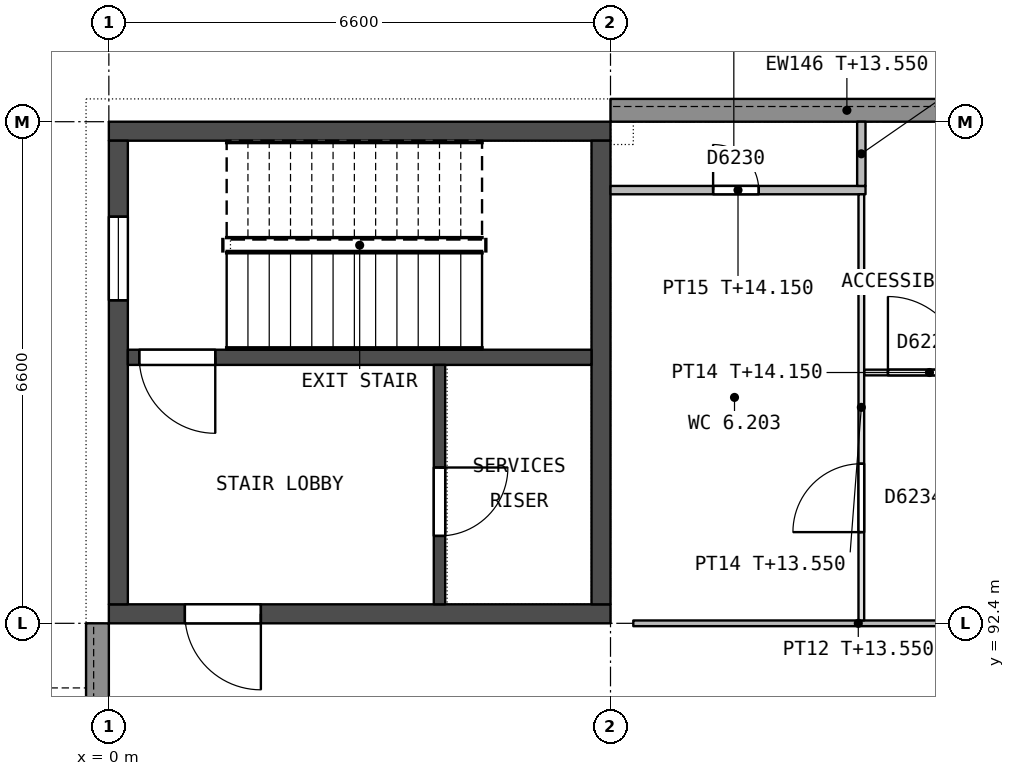
"""IFC4 building model, lengths in metres.
Left out: names, types, materials, properties, quantities, classifications, styles, units other than length and angle.
Written with IfcOpenShell. Run it as: python <this file> out.ifc"""

import sys

from ifc_helpers import new_model, si_unit, direction, frame, frame_2d, origin, place, context, subcontext, project, spatial, rectangle, extrude, element, fill, save


model = new_model("IFC4")
c1 = context("Model", 3, precision=1e-05, world=origin(), true_north=direction((0.0, 1.0)))
c2 = subcontext(c1, "Body", "Model", "MODEL_VIEW")
j1 = project(units=[si_unit("LENGTHUNIT", "METRE"), si_unit("PLANEANGLEUNIT", "RADIAN")], contexts=[c1])
p1 = place(None, origin())
s1 = spatial("IfcSite", under=j1, at=p1, CompositionType="ELEMENT")
p2 = place(p1, origin())
s2 = spatial("IfcBuilding", under=s1, at=p2, CompositionType="ELEMENT")
p3 = place(p2, frame((0.0, 0.0, 9.9)))
s3 = spatial("IfcBuildingStorey", under=s2, at=p3, CompositionType="ELEMENT", Elevation=9.9)
p4 = place(p3, frame((0.0, 92.525, 0.0), z_axis=(0.0, 0.0, 1.0), x_axis=(1.0, 0.0, 0.0)))
e1 = element("IfcWall", 1, at=p4, inside=s3, PredefinedType="SHEAR", context=c2, shape_type="SweptSolid", body=[
    extrude(rectangle(XDim=6.6, YDim=0.25, at=frame_2d((3.3, 0.0))), origin(), (0.0, 0.0, 1.0), 4.25),
])
p5 = place(p4, frame((1.0, 0.0, 0.0)))
e2 = element("IfcOpeningElement", 2, at=p5, cuts=e1, PredefinedType="OPENING", context=c2, shape_type="SweptSolid", body=[
    extrude(rectangle(XDim=1.0, YDim=2.1, at=frame_2d((0.5, 1.05))), frame((0.0, 0.135, 0.0), z_axis=(0.0, -1.0, 0.0), x_axis=(1.0, 0.0, 0.0)), (0.0, 0.0, 1.0), 0.27),
])
p6 = place(p3, frame((0.0, 98.875, 0.0), z_axis=(0.0, 0.0, 1.0), x_axis=(1.0, 0.0, 0.0)))
e3 = element("IfcWall", 3, at=p6, inside=s3, PredefinedType="SHEAR", context=c2, shape_type="SweptSolid", body=[
    extrude(rectangle(XDim=6.6, YDim=0.25, at=frame_2d((3.3, 0.0))), origin(), (0.0, 0.0, 1.0), 4.25),
])
p7 = place(p3, frame((0.125, 92.65, 0.0), z_axis=(0.0, 0.0, 1.0), x_axis=(0.0, 1.0, 0.0)))
e4 = element("IfcWall", 4, at=p7, inside=s3, PredefinedType="SHEAR", context=c2, shape_type="SweptSolid", body=[
    extrude(rectangle(XDim=6.1, YDim=0.25, at=frame_2d((3.05, 0.0))), origin(), (0.0, 0.0, 1.0), 4.25),
])
p8 = place(p7, frame((4.0, 0.0, 0.7)))
e5 = element("IfcOpeningElement", 5, at=p8, cuts=e4, PredefinedType="OPENING", context=c2, shape_type="SweptSolid", body=[
    extrude(rectangle(XDim=1.1, YDim=1.5, at=frame_2d((0.55, 0.75))), frame((0.0, 0.135, 0.0), z_axis=(0.0, -1.0, 0.0), x_axis=(1.0, 0.0, 0.0)), (0.0, 0.0, 1.0), 0.27),
])
p9 = place(p3, frame((6.475, 92.65, 0.0), z_axis=(0.0, 0.0, 1.0), x_axis=(0.0, 1.0, 0.0)))
e6 = element("IfcWall", 6, at=p9, inside=s3, PredefinedType="SHEAR", context=c2, shape_type="SweptSolid", body=[
    extrude(rectangle(XDim=6.1, YDim=0.25, at=frame_2d((3.05, 0.0))), origin(), (0.0, 0.0, 1.0), 4.25),
])
p10 = place(p3, frame((0.25, 95.9, 0.0), z_axis=(0.0, 0.0, 1.0), x_axis=(1.0, 0.0, 0.0)))
e7 = element("IfcWall", 7, at=p10, inside=s3, PredefinedType="SHEAR", context=c2, shape_type="SweptSolid", body=[
    extrude(rectangle(XDim=6.1, YDim=0.2, at=frame_2d((3.05, 0.0))), origin(), (0.0, 0.0, 1.0), 4.25),
])
p11 = place(p10, frame((0.15, 0.0, 0.0)))
e8 = element("IfcOpeningElement", 8, at=p11, cuts=e7, PredefinedType="OPENING", context=c2, shape_type="SweptSolid", body=[
    extrude(rectangle(XDim=1.0, YDim=2.1, at=frame_2d((0.5, 1.05))), frame((0.0, 0.11, 0.0), z_axis=(0.0, -1.0, 0.0), x_axis=(1.0, 0.0, 0.0)), (0.0, 0.0, 1.0), 0.22),
])
p12 = place(p3, frame((4.35, 92.65, 0.0), z_axis=(0.0, 0.0, 1.0), x_axis=(0.0, 1.0, 0.0)))
e9 = element("IfcWall", 9, at=p12, inside=s3, PredefinedType="SHEAR", context=c2, shape_type="SweptSolid", body=[
    extrude(rectangle(XDim=3.15, YDim=0.15, at=frame_2d((1.575, 0.0))), origin(), (0.0, 0.0, 1.0), 4.25),
])
p13 = place(p12, frame((0.9, 0.0, 0.0)))
e10 = element("IfcOpeningElement", 10, at=p13, cuts=e9, PredefinedType="OPENING", context=c2, shape_type="SweptSolid", body=[
    extrude(rectangle(XDim=0.9, YDim=2.1, at=frame_2d((0.45, 1.05))), frame((0.0, 0.085, 0.0), z_axis=(0.0, -1.0, 0.0), x_axis=(1.0, 0.0, 0.0)), (0.0, 0.0, 1.0), 0.17),
])
p14 = place(p3, frame((6.6, 99.15, 0.0), z_axis=(0.0, 0.0, 1.0), x_axis=(1.0, 0.0, 0.0)))
e11 = element("IfcWall", 11, at=p14, inside=s3, PredefinedType="STANDARD", context=c2, shape_type="SweptSolid", body=[
    extrude(rectangle(XDim=6.3, YDim=0.3, at=frame_2d((3.15, 0.0))), origin(), (0.0, 0.0, 1.0), 3.65),
])
p15 = place(p3, frame((-0.15, 89.3, 0.0), z_axis=(0.0, 0.0, 1.0), x_axis=(0.0, 1.0, 0.0)))
e12 = element("IfcWall", 12, at=p15, inside=s3, PredefinedType="STANDARD", context=c2, shape_type="SweptSolid", body=[
    extrude(rectangle(XDim=3.1, YDim=0.3, at=frame_2d((1.55, 0.0))), origin(), (0.0, 0.0, 1.0), 3.65),
])
p16 = place(p15, frame((0.85, 0.0, 1.1)))
e13 = element("IfcOpeningElement", 13, at=p16, cuts=e12, PredefinedType="OPENING", context=c2, shape_type="SweptSolid", body=[
    extrude(rectangle(XDim=1.2, YDim=1.2, at=frame_2d((0.6, 0.6))), frame((0.0, 0.16, 0.0), z_axis=(0.0, -1.0, 0.0), x_axis=(1.0, 0.0, 0.0)), (0.0, 0.0, 1.0), 0.32),
])
p17 = place(p3, frame((6.9, 92.4, 0.0), z_axis=(0.0, 0.0, 1.0), x_axis=(1.0, 0.0, 0.0)))
e14 = element("IfcWall", 14, at=p17, inside=s3, PredefinedType="PARTITIONING", context=c2, shape_type="SweptSolid", body=[
    extrude(rectangle(XDim=6.0, YDim=0.075, at=frame_2d((3.0, 0.0))), origin(), (0.0, 0.0, 1.0), 3.65),
])
p18 = place(p17, frame((4.2, 0.0, 0.0)))
e15 = element("IfcOpeningElement", 15, at=p18, cuts=e14, PredefinedType="OPENING", context=c2, shape_type="SweptSolid", body=[
    extrude(rectangle(XDim=0.9, YDim=2.1, at=frame_2d((0.45, 1.05))), frame((0.0, 0.047, 0.0), z_axis=(0.0, -1.0, 0.0), x_axis=(1.0, 0.0, 0.0)), (0.0, 0.0, 1.0), 0.095),
])
p19 = place(p3, frame((11.655, 95.7, 0.0), z_axis=(0.0, 0.0, 1.0), x_axis=(-1.0, 0.0, 0.0)))
e16 = element("IfcWall", 16, at=p19, inside=s3, PredefinedType="PARTITIONING", context=c2, shape_type="SweptSolid", body=[
    extrude(rectangle(XDim=1.717, YDim=0.075, at=frame_2d((0.858, 0.0))), origin(), (0.0, 0.0, 1.0), 4.25),
])
p20 = place(p19, frame((0.405, 0.0, 0.0)))
e17 = element("IfcOpeningElement", 17, at=p20, cuts=e16, PredefinedType="OPENING", context=c2, shape_type="SweptSolid", body=[
    extrude(rectangle(XDim=1.0, YDim=2.1, at=frame_2d((0.5, 1.05))), frame((0.0, 0.047, 0.0), z_axis=(0.0, -1.0, 0.0), x_axis=(1.0, 0.0, 0.0)), (0.0, 0.0, 1.0), 0.095),
])
p21 = place(p3, frame((9.955, 98.1, 0.0), z_axis=(0.0, 0.0, 1.0), x_axis=(-1.0, 0.0, 0.0)))
e18 = element("IfcWall", 18, at=p21, inside=s3, PredefinedType="PARTITIONING", context=c2, shape_type="SweptSolid", body=[
    extrude(rectangle(XDim=3.355, YDim=0.11, at=frame_2d((1.677, 0.0))), origin(), (0.0, 0.0, 1.0), 4.25),
])
p22 = place(p21, frame((1.405, 0.0, 0.0)))
e19 = element("IfcOpeningElement", 19, at=p22, cuts=e18, PredefinedType="OPENING", context=c2, shape_type="SweptSolid", body=[
    extrude(rectangle(XDim=0.6, YDim=2.1, at=frame_2d((0.3, 1.05))), frame((0.0, 0.065, 0.0), z_axis=(0.0, -1.0, 0.0), x_axis=(1.0, 0.0, 0.0)), (0.0, 0.0, 1.0), 0.13),
])
p23 = place(p3, frame((9.9, 92.438, 0.0), z_axis=(0.0, 0.0, 1.0), x_axis=(0.0, 1.0, 0.0)))
e20 = element("IfcWall", 20, at=p23, inside=s3, PredefinedType="PARTITIONING", context=c2, shape_type="SweptSolid", body=[
    extrude(rectangle(XDim=5.607, YDim=0.075, at=frame_2d((2.803, 0.0))), origin(), (0.0, 0.0, 1.0), 3.65),
])
p24 = place(p23, frame((1.162, 0.0, 0.0)))
e21 = element("IfcOpeningElement", 21, at=p24, cuts=e20, PredefinedType="OPENING", context=c2, shape_type="SweptSolid", body=[
    extrude(rectangle(XDim=0.9, YDim=2.1, at=frame_2d((0.45, 1.05))), frame((0.0, 0.047, 0.0), z_axis=(0.0, -1.0, 0.0), x_axis=(1.0, 0.0, 0.0)), (0.0, 0.0, 1.0), 0.095),
])
p25 = place(p3, frame((9.9, 98.155, 0.0), z_axis=(0.0, 0.0, 1.0), x_axis=(0.0, 1.0, 0.0)))
e22 = element("IfcWall", 22, at=p25, inside=s3, PredefinedType="PARTITIONING", context=c2, shape_type="SweptSolid", body=[
    extrude(rectangle(XDim=0.845, YDim=0.11, at=frame_2d((0.422, 0.0))), origin(), (0.0, 0.0, 1.0), 3.65),
])
p26 = place(p13, origin())
e23 = element("IfcDoor", 23, at=p26, inside=s3, OperationType="SINGLE_SWING_RIGHT", PredefinedType="DOOR", context=c2, shape_type="SweptSolid", body=[
    extrude(rectangle(XDim=0.9, YDim=2.1, at=frame_2d((0.45, 1.05))), frame((0.0, 0.025, 0.0), z_axis=(0.0, -1.0, 0.0), x_axis=(1.0, 0.0, 0.0)), (0.0, 0.0, 1.0), 0.05),
])
fill(e10, e23)
p27 = place(p5, origin())
e24 = element("IfcDoor", 24, at=p27, inside=s3, OperationType="SINGLE_SWING_RIGHT", PredefinedType="DOOR", context=c2, shape_type="SweptSolid", body=[
    extrude(rectangle(XDim=1.0, YDim=2.1, at=frame_2d((0.5, 1.05))), frame((0.0, 0.025, 0.0), z_axis=(0.0, -1.0, 0.0), x_axis=(1.0, 0.0, 0.0)), (0.0, 0.0, 1.0), 0.05),
])
fill(e2, e24)
p28 = place(p11, origin())
e25 = element("IfcDoor", 25, at=p28, inside=s3, OperationType="SINGLE_SWING_RIGHT", PredefinedType="DOOR", context=c2, shape_type="SweptSolid", body=[
    extrude(rectangle(XDim=1.0, YDim=2.1, at=frame_2d((0.5, 1.05))), frame((0.0, 0.025, 0.0), z_axis=(0.0, -1.0, 0.0), x_axis=(1.0, 0.0, 0.0)), (0.0, 0.0, 1.0), 0.05),
])
fill(e8, e25)
p29 = place(p8, origin())
e26 = element("IfcWindow", 26, at=p29, inside=s3, PartitioningType="SINGLE_PANEL", PredefinedType="WINDOW", context=c2, shape_type="SweptSolid", body=[
    extrude(rectangle(XDim=1.1, YDim=1.5, at=frame_2d((0.55, 0.75))), frame((0.0, 0.03, 0.0), z_axis=(0.0, -1.0, 0.0), x_axis=(1.0, 0.0, 0.0)), (0.0, 0.0, 1.0), 0.06),
])
fill(e5, e26)
p30 = place(p20, origin())
e27 = element("IfcDoor", 27, at=p30, inside=s3, OperationType="SINGLE_SWING_RIGHT", PredefinedType="DOOR", context=c2, shape_type="SweptSolid", body=[
    extrude(rectangle(XDim=1.0, YDim=2.1, at=frame_2d((0.5, 1.05))), frame((0.0, 0.025, 0.0), z_axis=(0.0, -1.0, 0.0), x_axis=(1.0, 0.0, 0.0)), (0.0, 0.0, 1.0), 0.05),
])
fill(e17, e27)
p31 = place(p22, origin())
e28 = element("IfcDoor", 28, at=p31, inside=s3, OperationType="SINGLE_SWING_RIGHT", PredefinedType="DOOR", context=c2, shape_type="SweptSolid", body=[
    extrude(rectangle(XDim=0.6, YDim=2.1, at=frame_2d((0.3, 1.05))), frame((0.0, 0.025, 0.0), z_axis=(0.0, -1.0, 0.0), x_axis=(1.0, 0.0, 0.0)), (0.0, 0.0, 1.0), 0.05),
])
fill(e19, e28)
p32 = place(p24, origin())
e29 = element("IfcDoor", 29, at=p32, inside=s3, OperationType="SINGLE_SWING_LEFT", PredefinedType="DOOR", context=c2, shape_type="SweptSolid", body=[
    extrude(rectangle(XDim=0.9, YDim=2.1, at=frame_2d((0.45, 1.05))), frame((0.0, 0.025, 0.0), z_axis=(0.0, -1.0, 0.0), x_axis=(1.0, 0.0, 0.0)), (0.0, 0.0, 1.0), 0.05),
])
fill(e21, e29)
save(model, sys.argv[1])
